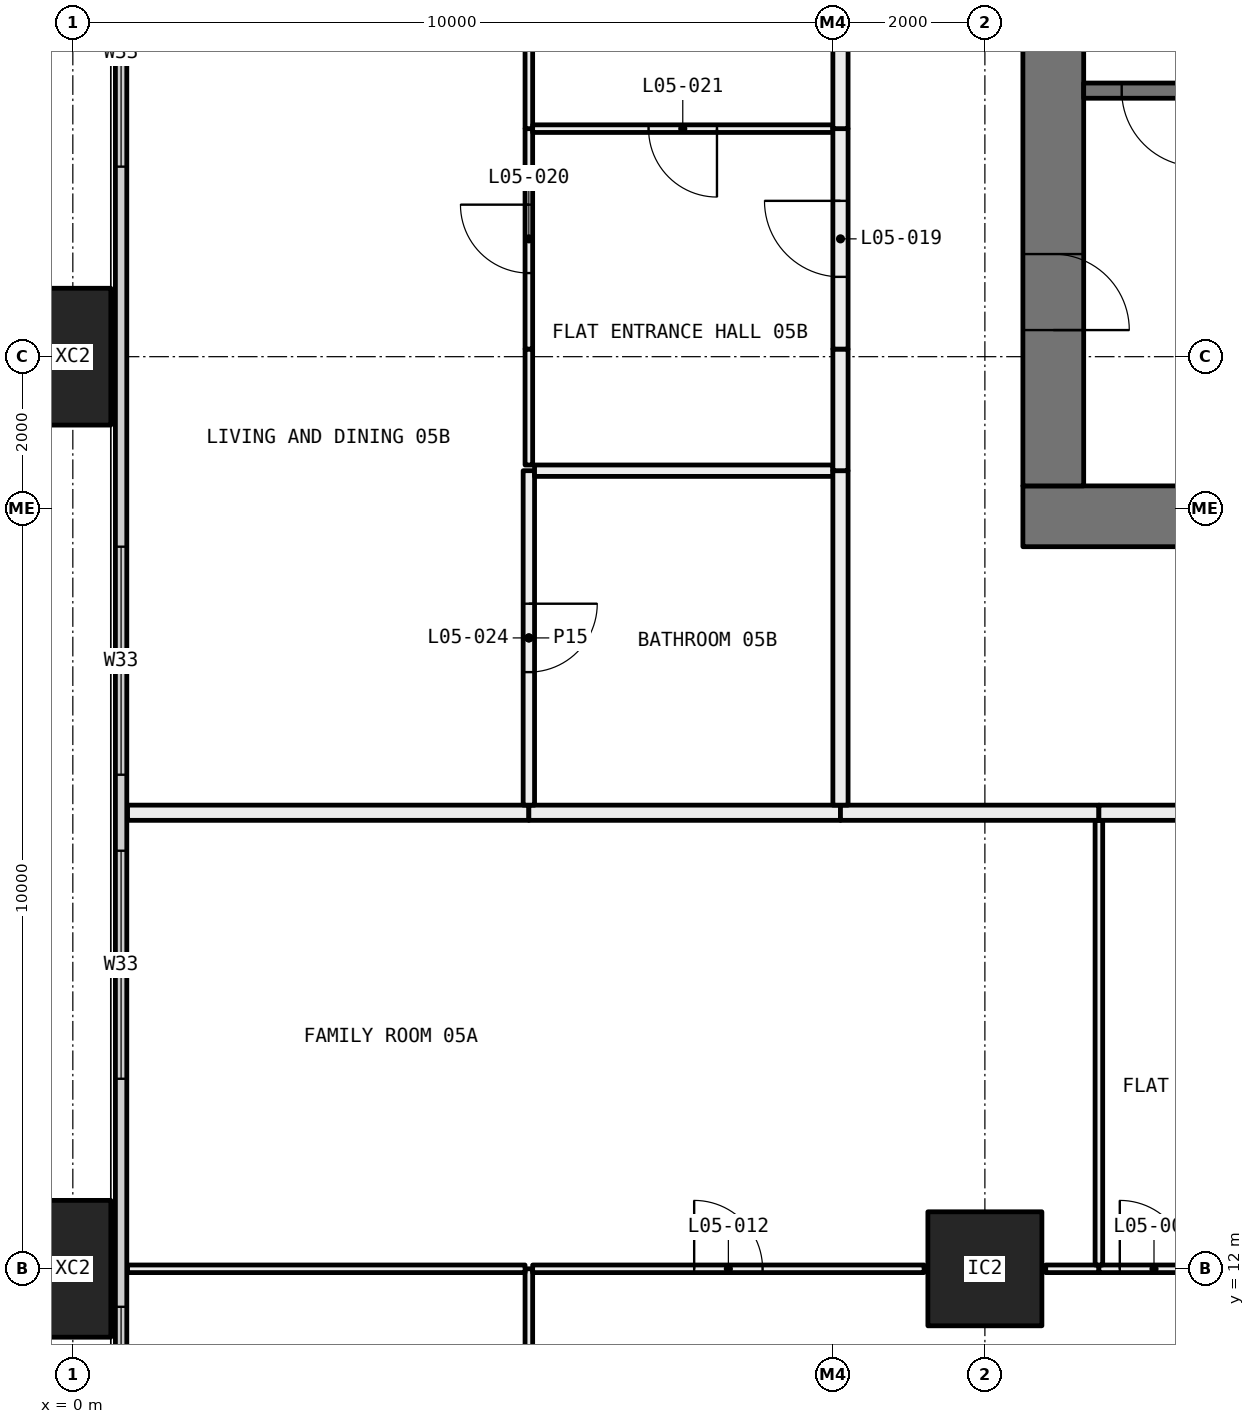
"""IFC4 building model, lengths in metres.
Left out: names, types, materials, properties, quantities, classifications, styles, units other than length and angle.
Written with IfcOpenShell. Run it as: python <this file> out.ifc"""

import sys

from ifc_helpers import new_model, si_unit, direction, frame, frame_2d, origin, origin_2d, place, context, subcontext, project, spatial, rectangle, hollow_rectangle, extrude, element, fill, save


model = new_model("IFC4")
c1 = context("Model", 3, precision=1e-05, world=origin(), true_north=direction((0.0, 1.0)))
c2 = subcontext(c1, "Body", "Model", "MODEL_VIEW")
j1 = project(units=[si_unit("LENGTHUNIT", "METRE"), si_unit("PLANEANGLEUNIT", "RADIAN")], contexts=[c1])
p1 = place(None, origin())
s1 = spatial("IfcSite", under=j1, at=p1, CompositionType="ELEMENT")
p2 = place(p1, origin())
s2 = spatial("IfcBuilding", under=s1, at=p2, CompositionType="ELEMENT")
p3 = place(p2, frame((0.0, 0.0, 30.0)))
s3 = spatial("IfcBuildingStorey", under=s2, at=p3, CompositionType="ELEMENT", Elevation=30.0)
for number, where, z_axis, x_axis in (
    (1, (0.0, 12.0, -0.4), (0.0, 0.0, 1.0), (0.0, 1.0, 0.0)),
    (2, (0.0, 24.0, -0.4), (0.0, 0.0, 1.0), (0.0, 1.0, 0.0)),
):
    element("IfcColumn", number, at=place(p3, frame(where, z_axis=z_axis, x_axis=x_axis)), inside=s3, PredefinedType="COLUMN", context=c2, shape_type="SweptSolid", body=[
        extrude(hollow_rectangle(XDim=1.8, YDim=1.0, WallThickness=0.07, at=origin_2d()), origin(), (0.0, 0.0, 1.0), 3.45),
    ])
p4 = place(p3, frame((12.0, 12.0, 0.0), z_axis=(0.0, 0.0, 1.0), x_axis=(1.0, 0.0, 0.0)))
e3 = element("IfcColumn", 3, at=p4, inside=s3, PredefinedType="COLUMN", context=c2, shape_type="SweptSolid", body=[
    extrude(hollow_rectangle(XDim=1.5, YDim=1.5, WallThickness=0.065, at=origin_2d()), origin(), (0.0, 0.0, 1.0), 3.05),
])
p5 = place(p3, frame((0.635, 6.71, 0.0), z_axis=(0.0, 0.0, 1.0), x_axis=(0.0, 1.0, 0.0)))
e4 = element("IfcWall", 4, at=p5, inside=s3, PredefinedType="ELEMENTEDWALL", context=c2, shape_type="SweptSolid", body=[
    extrude(rectangle(XDim=34.58, YDim=0.15, at=frame_2d((17.29, 0.0))), origin(), (0.0, 0.0, 1.0), 3.05),
])
p6 = place(p5, frame((0.29, 0.0, 0.45)))
e5 = element("IfcOpeningElement", 5, at=p6, cuts=e4, PredefinedType="OPENING", context=c2, shape_type="SweptSolid", body=[
    extrude(rectangle(XDim=4.5, YDim=2.55, at=frame_2d((2.25, 1.275))), frame((0.0, 0.085, 0.0), z_axis=(0.0, -1.0, 0.0), x_axis=(1.0, 0.0, 0.0)), (0.0, 0.0, 1.0), 0.17),
])
p7 = place(p5, frame((7.79, 0.0, 0.45)))
e6 = element("IfcOpeningElement", 6, at=p7, cuts=e4, PredefinedType="OPENING", context=c2, shape_type="SweptSolid", body=[
    extrude(rectangle(XDim=3.0, YDim=2.55, at=frame_2d((1.5, 1.275))), frame((0.0, 0.085, 0.0), z_axis=(0.0, -1.0, 0.0), x_axis=(1.0, 0.0, 0.0)), (0.0, 0.0, 1.0), 0.17),
])
p8 = place(p5, frame((11.79, 0.0, 0.45)))
e7 = element("IfcOpeningElement", 7, at=p8, cuts=e4, PredefinedType="OPENING", context=c2, shape_type="SweptSolid", body=[
    extrude(rectangle(XDim=3.0, YDim=2.55, at=frame_2d((1.5, 1.275))), frame((0.0, 0.085, 0.0), z_axis=(0.0, -1.0, 0.0), x_axis=(1.0, 0.0, 0.0)), (0.0, 0.0, 1.0), 0.17),
])
p9 = place(p5, frame((19.79, 0.0, 0.45)))
e8 = element("IfcOpeningElement", 8, at=p9, cuts=e4, PredefinedType="OPENING", context=c2, shape_type="SweptSolid", body=[
    extrude(rectangle(XDim=3.0, YDim=2.55, at=frame_2d((1.5, 1.275))), frame((0.0, 0.085, 0.0), z_axis=(0.0, -1.0, 0.0), x_axis=(1.0, 0.0, 0.0)), (0.0, 0.0, 1.0), 0.17),
])
p10 = place(p5, frame((23.79, 0.0, 0.45)))
e9 = element("IfcOpeningElement", 9, at=p10, cuts=e4, PredefinedType="OPENING", context=c2, shape_type="SweptSolid", body=[
    extrude(rectangle(XDim=2.0, YDim=2.55, at=frame_2d((1.0, 1.275))), frame((0.0, 0.085, 0.0), z_axis=(0.0, -1.0, 0.0), x_axis=(1.0, 0.0, 0.0)), (0.0, 0.0, 1.0), 0.17),
])
p11 = place(p5, frame((29.79, 0.0, 0.45)))
e10 = element("IfcOpeningElement", 10, at=p11, cuts=e4, PredefinedType="OPENING", context=c2, shape_type="SweptSolid", body=[
    extrude(rectangle(XDim=4.5, YDim=2.55, at=frame_2d((2.25, 1.275))), frame((0.0, 0.085, 0.0), z_axis=(0.0, -1.0, 0.0), x_axis=(1.0, 0.0, 0.0)), (0.0, 0.0, 1.0), 0.17),
])
p12 = place(p3, frame((6.0, 6.72, 0.0), z_axis=(0.0, 0.0, 1.0), x_axis=(0.0, 1.0, 0.0)))
e11 = element("IfcWall", 11, at=p12, inside=s3, PredefinedType="PARTITIONING", context=c2, shape_type="SweptSolid", body=[
    extrude(rectangle(XDim=5.28, YDim=0.1, at=frame_2d((2.64, 0.0))), origin(), (0.0, 0.0, 1.0), 2.45),
])
p13 = place(p12, frame((2.19, 0.0, 0.0)))
e12 = element("IfcOpeningElement", 12, at=p13, cuts=e11, PredefinedType="OPENING", context=c2, shape_type="SweptSolid", body=[
    extrude(rectangle(XDim=0.9, YDim=2.1, at=frame_2d((0.45, 1.05))), frame((0.0, 0.06, 0.0), z_axis=(0.0, -1.0, 0.0), x_axis=(1.0, 0.0, 0.0)), (0.0, 0.0, 1.0), 0.12),
])
p14 = place(p3, frame((5.95, 12.0, 0.0), z_axis=(0.0, 0.0, 1.0), x_axis=(-1.0, 0.0, 0.0)))
e13 = element("IfcWall", 13, at=p14, inside=s3, PredefinedType="PARTITIONING", context=c2, shape_type="SweptSolid", body=[
    extrude(rectangle(XDim=5.23, YDim=0.1, at=frame_2d((2.615, 0.0))), origin(), (0.0, 0.0, 1.0), 2.45),
])
p15 = place(p3, frame((11.2, 12.0, 0.0), z_axis=(0.0, 0.0, 1.0), x_axis=(-1.0, 0.0, 0.0)))
e14 = element("IfcWall", 14, at=p15, inside=s3, PredefinedType="PARTITIONING", context=c2, shape_type="SweptSolid", body=[
    extrude(rectangle(XDim=5.15, YDim=0.1, at=frame_2d((2.575, 0.0))), origin(), (0.0, 0.0, 1.0), 2.45),
])
p16 = place(p15, frame((2.125, 0.0, 0.0)))
e15 = element("IfcOpeningElement", 15, at=p16, cuts=e14, PredefinedType="OPENING", context=c2, shape_type="SweptSolid", body=[
    extrude(rectangle(XDim=0.9, YDim=2.1, at=frame_2d((0.45, 1.05))), frame((0.0, 0.06, 0.0), z_axis=(0.0, -1.0, 0.0), x_axis=(1.0, 0.0, 0.0)), (0.0, 0.0, 1.0), 0.12),
])
p17 = place(p3, frame((13.5, 12.0, 0.0), z_axis=(0.0, 0.0, 1.0), x_axis=(-1.0, 0.0, 0.0)))
e16 = element("IfcWall", 16, at=p17, inside=s3, PredefinedType="PARTITIONING", context=c2, shape_type="SweptSolid", body=[
    extrude(rectangle(XDim=0.7, YDim=0.1, at=frame_2d((0.35, 0.0))), origin(), (0.0, 0.0, 1.0), 2.45),
])
p18 = place(p3, frame((14.95, 12.0, 0.0), z_axis=(0.0, 0.0, 1.0), x_axis=(-1.0, 0.0, 0.0)))
e17 = element("IfcWall", 17, at=p18, inside=s3, PredefinedType="PARTITIONING", context=c2, shape_type="SweptSolid", body=[
    extrude(rectangle(XDim=1.45, YDim=0.1, at=frame_2d((0.725, 0.0))), origin(), (0.0, 0.0, 1.0), 2.45),
])
p19 = place(p18, frame((0.275, 0.0, 0.0)))
e18 = element("IfcOpeningElement", 18, at=p19, cuts=e17, PredefinedType="OPENING", context=c2, shape_type="SweptSolid", body=[
    extrude(rectangle(XDim=0.9, YDim=2.1, at=frame_2d((0.45, 1.05))), frame((0.0, 0.06, 0.0), z_axis=(0.0, -1.0, 0.0), x_axis=(1.0, 0.0, 0.0)), (0.0, 0.0, 1.0), 0.12),
])
p20 = place(p3, frame((13.5, 12.05, 0.0), z_axis=(0.0, 0.0, 1.0), x_axis=(0.0, 1.0, 0.0)))
e19 = element("IfcWall", 19, at=p20, inside=s3, PredefinedType="PARTITIONING", context=c2, shape_type="SweptSolid", body=[
    extrude(rectangle(XDim=5.85, YDim=0.1, at=frame_2d((2.925, 0.0))), origin(), (0.0, 0.0, 1.0), 2.45),
])
p21 = place(p3, frame((6.0, 18.0, 0.0), z_axis=(0.0, 0.0, 1.0), x_axis=(-1.0, 0.0, 0.0)))
e20 = element("IfcWall", 20, at=p21, inside=s3, PredefinedType="PARTITIONING", context=c2, shape_type="SweptSolid", body=[
    extrude(rectangle(XDim=5.28, YDim=0.2, at=frame_2d((2.64, 0.0))), origin(), (0.0, 0.0, 1.0), 3.05),
])
p22 = place(p3, frame((10.1, 18.0, 0.0), z_axis=(0.0, 0.0, 1.0), x_axis=(-1.0, 0.0, 0.0)))
e21 = element("IfcWall", 21, at=p22, inside=s3, PredefinedType="PARTITIONING", context=c2, shape_type="SweptSolid", body=[
    extrude(rectangle(XDim=4.1, YDim=0.2, at=frame_2d((2.05, 0.0))), origin(), (0.0, 0.0, 1.0), 3.05),
])
p23 = place(p3, frame((13.5, 18.0, 0.0), z_axis=(0.0, 0.0, 1.0), x_axis=(-1.0, 0.0, 0.0)))
e22 = element("IfcWall", 22, at=p23, inside=s3, PredefinedType="PARTITIONING", context=c2, shape_type="SweptSolid", body=[
    extrude(rectangle(XDim=3.4, YDim=0.2, at=frame_2d((1.7, 0.0))), origin(), (0.0, 0.0, 1.0), 3.05),
])
p24 = place(p3, frame((18.0, 18.0, 0.0), z_axis=(0.0, 0.0, 1.0), x_axis=(-1.0, 0.0, 0.0)))
e23 = element("IfcWall", 23, at=p24, inside=s3, PredefinedType="PARTITIONING", context=c2, shape_type="SweptSolid", body=[
    extrude(rectangle(XDim=4.5, YDim=0.2, at=frame_2d((2.25, 0.0))), origin(), (0.0, 0.0, 1.0), 3.05),
])
p25 = place(p24, frame((1.75, 0.0, 0.0)))
e24 = element("IfcOpeningElement", 24, at=p25, cuts=e23, PredefinedType="OPENING", context=c2, shape_type="SweptSolid", body=[
    extrude(rectangle(XDim=1.0, YDim=2.1, at=frame_2d((0.5, 1.05))), frame((0.0, 0.11, 0.0), z_axis=(0.0, -1.0, 0.0), x_axis=(1.0, 0.0, 0.0)), (0.0, 0.0, 1.0), 0.22),
])
p26 = place(p3, frame((6.0, 18.1, 0.0), z_axis=(0.0, 0.0, 1.0), x_axis=(0.0, 1.0, 0.0)))
e25 = element("IfcWall", 25, at=p26, inside=s3, PredefinedType="PARTITIONING", context=c2, shape_type="SweptSolid", body=[
    extrude(rectangle(XDim=4.4, YDim=0.15, at=frame_2d((2.2, 0.0))), origin(), (0.0, 0.0, 1.0), 3.05),
])
p27 = place(p26, frame((1.75, 0.0, 0.0)))
e26 = element("IfcOpeningElement", 26, at=p27, cuts=e25, PredefinedType="OPENING", context=c2, shape_type="SweptSolid", body=[
    extrude(rectangle(XDim=0.9, YDim=2.1, at=frame_2d((0.45, 1.05))), frame((0.0, 0.085, 0.0), z_axis=(0.0, -1.0, 0.0), x_axis=(1.0, 0.0, 0.0)), (0.0, 0.0, 1.0), 0.17),
])
p28 = place(p3, frame((6.0, 22.575, 0.0), z_axis=(0.0, 0.0, 1.0), x_axis=(0.0, 1.0, 0.0)))
e27 = element("IfcWall", 27, at=p28, inside=s3, PredefinedType="PARTITIONING", context=c2, shape_type="SweptSolid", body=[
    extrude(rectangle(XDim=1.525, YDim=0.1, at=frame_2d((0.763, 0.0))), origin(), (0.0, 0.0, 1.0), 2.45),
])
p29 = place(p3, frame((6.0, 24.1, 0.0), z_axis=(0.0, 0.0, 1.0), x_axis=(0.0, 1.0, 0.0)))
e28 = element("IfcWall", 28, at=p29, inside=s3, PredefinedType="PARTITIONING", context=c2, shape_type="SweptSolid", body=[
    extrude(rectangle(XDim=2.9, YDim=0.1, at=frame_2d((1.45, 0.0))), origin(), (0.0, 0.0, 1.0), 3.05),
])
p30 = place(p29, frame((1.0, 0.0, 0.0)))
e29 = element("IfcOpeningElement", 29, at=p30, cuts=e28, PredefinedType="OPENING", context=c2, shape_type="SweptSolid", body=[
    extrude(rectangle(XDim=0.9, YDim=2.1, at=frame_2d((0.45, 1.05))), frame((0.0, 0.06, 0.0), z_axis=(0.0, -1.0, 0.0), x_axis=(1.0, 0.0, 0.0)), (0.0, 0.0, 1.0), 0.12),
])
p31 = place(p3, frame((6.0, 27.0, 0.0), z_axis=(0.0, 0.0, 1.0), x_axis=(0.0, 1.0, 0.0)))
e30 = element("IfcWall", 30, at=p31, inside=s3, PredefinedType="PARTITIONING", context=c2, shape_type="SweptSolid", body=[
    extrude(rectangle(XDim=2.95, YDim=0.1, at=frame_2d((1.475, 0.0))), origin(), (0.0, 0.0, 1.0), 3.05),
])
p32 = place(p3, frame((10.0, 22.5, 0.0), z_axis=(0.0, 0.0, 1.0), x_axis=(-1.0, 0.0, 0.0)))
e31 = element("IfcWall", 31, at=p32, inside=s3, PredefinedType="PARTITIONING", context=c2, shape_type="SweptSolid", body=[
    extrude(rectangle(XDim=3.925, YDim=0.15, at=frame_2d((1.962, 0.0))), origin(), (0.0, 0.0, 1.0), 3.05),
])
p33 = place(p3, frame((10.1, 18.1, 0.0), z_axis=(0.0, 0.0, 1.0), x_axis=(0.0, 1.0, 0.0)))
e32 = element("IfcWall", 32, at=p33, inside=s3, PredefinedType="PARTITIONING", context=c2, shape_type="SweptSolid", body=[
    extrude(rectangle(XDim=4.4, YDim=0.2, at=frame_2d((2.2, 0.0))), origin(), (0.0, 0.0, 1.0), 3.05),
])
p34 = place(p3, frame((10.0, 27.0, 0.0), z_axis=(0.0, 0.0, 1.0), x_axis=(-1.0, 0.0, 0.0)))
e33 = element("IfcWall", 33, at=p34, inside=s3, PredefinedType="PARTITIONING", context=c2, shape_type="SweptSolid", body=[
    extrude(rectangle(XDim=3.95, YDim=0.1, at=frame_2d((1.975, 0.0))), origin(), (0.0, 0.0, 1.0), 3.05),
])
p35 = place(p34, frame((1.525, 0.0, 0.0)))
e34 = element("IfcOpeningElement", 34, at=p35, cuts=e33, PredefinedType="OPENING", context=c2, shape_type="SweptSolid", body=[
    extrude(rectangle(XDim=0.9, YDim=2.1, at=frame_2d((0.45, 1.05))), frame((0.0, 0.06, 0.0), z_axis=(0.0, -1.0, 0.0), x_axis=(1.0, 0.0, 0.0)), (0.0, 0.0, 1.0), 0.12),
])
p36 = place(p3, frame((10.1, 22.5, 0.0), z_axis=(0.0, 0.0, 1.0), x_axis=(0.0, 1.0, 0.0)))
e35 = element("IfcWall", 35, at=p36, inside=s3, PredefinedType="PARTITIONING", context=c2, shape_type="SweptSolid", body=[
    extrude(rectangle(XDim=1.6, YDim=0.2, at=frame_2d((0.8, 0.0))), origin(), (0.0, 0.0, 1.0), 2.45),
])
p37 = place(p3, frame((10.1, 24.1, 0.0), z_axis=(0.0, 0.0, 1.0), x_axis=(0.0, 1.0, 0.0)))
e36 = element("IfcWall", 36, at=p37, inside=s3, PredefinedType="PARTITIONING", context=c2, shape_type="SweptSolid", body=[
    extrude(rectangle(XDim=2.9, YDim=0.2, at=frame_2d((1.45, 0.0))), origin(), (0.0, 0.0, 1.0), 3.05),
])
p38 = place(p37, frame((0.95, 0.0, 0.0)))
e37 = element("IfcOpeningElement", 37, at=p38, cuts=e36, PredefinedType="OPENING", context=c2, shape_type="SweptSolid", body=[
    extrude(rectangle(XDim=1.0, YDim=2.1, at=frame_2d((0.5, 1.05))), frame((0.0, 0.11, 0.0), z_axis=(0.0, -1.0, 0.0), x_axis=(1.0, 0.0, 0.0)), (0.0, 0.0, 1.0), 0.22),
])
p39 = place(p3, frame((10.1, 27.0, 0.0), z_axis=(0.0, 0.0, 1.0), x_axis=(0.0, 1.0, 0.0)))
e38 = element("IfcWall", 38, at=p39, inside=s3, PredefinedType="PARTITIONING", context=c2, shape_type="SweptSolid", body=[
    extrude(rectangle(XDim=9.1, YDim=0.2, at=frame_2d((4.55, 0.0))), origin(), (0.0, 0.0, 1.0), 2.45),
])
p40 = place(p3, frame((12.5, 21.9, 0.0), z_axis=(0.0, 0.0, 1.0), x_axis=(1.0, 0.0, 0.0)))
e39 = element("IfcWall", 39, at=p40, inside=s3, PredefinedType="SHEAR", context=c2, shape_type="SweptSolid", body=[
    extrude(rectangle(XDim=11.0, YDim=0.8, at=frame_2d((5.5, 0.0))), origin(), (0.0, 0.0, 1.0), 3.05),
])
p41 = place(p3, frame((12.9, 22.3, 0.0), z_axis=(0.0, 0.0, 1.0), x_axis=(0.0, 1.0, 0.0)))
e40 = element("IfcWall", 40, at=p41, inside=s3, PredefinedType="SHEAR", context=c2, shape_type="SweptSolid", body=[
    extrude(rectangle(XDim=15.4, YDim=0.8, at=frame_2d((7.7, 0.0))), origin(), (0.0, 0.0, 1.0), 3.05),
])
p42 = place(p41, frame((8.15, 0.0, 0.0)))
e41 = element("IfcOpeningElement", 41, at=p42, cuts=e40, PredefinedType="OPENING", context=c2, shape_type="SweptSolid", body=[
    extrude(rectangle(XDim=1.6, YDim=2.1, at=frame_2d((0.8, 1.05))), frame((0.0, 0.41, 0.0), z_axis=(0.0, -1.0, 0.0), x_axis=(1.0, 0.0, 0.0)), (0.0, 0.0, 1.0), 0.82),
])
p43 = place(p41, frame((2.05, 0.0, 0.0)))
e42 = element("IfcOpeningElement", 42, at=p43, cuts=e40, PredefinedType="OPENING", context=c2, shape_type="SweptSolid", body=[
    extrude(rectangle(XDim=1.0, YDim=2.1, at=frame_2d((0.5, 1.05))), frame((0.0, 0.41, 0.0), z_axis=(0.0, -1.0, 0.0), x_axis=(1.0, 0.0, 0.0)), (0.0, 0.0, 1.0), 0.82),
])
p44 = place(p3, frame((13.3, 27.5, 0.0), z_axis=(0.0, 0.0, 1.0), x_axis=(1.0, 0.0, 0.0)))
e43 = element("IfcWall", 43, at=p44, inside=s3, PredefinedType="SOLIDWALL", context=c2, shape_type="SweptSolid", body=[
    extrude(rectangle(XDim=2.0, YDim=0.2, at=frame_2d((1.0, 0.0))), origin(), (0.0, 0.0, 1.0), 3.05),
])
p45 = place(p44, frame((0.5, 0.0, 0.0)))
e44 = element("IfcOpeningElement", 44, at=p45, cuts=e43, PredefinedType="OPENING", context=c2, shape_type="SweptSolid", body=[
    extrude(rectangle(XDim=1.0, YDim=2.1, at=frame_2d((0.5, 1.05))), frame((0.0, 0.11, 0.0), z_axis=(0.0, -1.0, 0.0), x_axis=(1.0, 0.0, 0.0)), (0.0, 0.0, 1.0), 0.22),
])
p46 = place(p6, origin())
e45 = element("IfcWindow", 45, at=p46, inside=s3, PartitioningType="SINGLE_PANEL", PredefinedType="WINDOW", context=c2, shape_type="SweptSolid", body=[
    extrude(rectangle(XDim=4.5, YDim=2.55, at=frame_2d((2.25, 1.275))), frame((0.0, 0.03, 0.0), z_axis=(0.0, -1.0, 0.0), x_axis=(1.0, 0.0, 0.0)), (0.0, 0.0, 1.0), 0.06),
])
fill(e5, e45)
p47 = place(p7, origin())
e46 = element("IfcWindow", 46, at=p47, inside=s3, PartitioningType="SINGLE_PANEL", PredefinedType="WINDOW", context=c2, shape_type="SweptSolid", body=[
    extrude(rectangle(XDim=3.0, YDim=2.55, at=frame_2d((1.5, 1.275))), frame((0.0, 0.03, 0.0), z_axis=(0.0, -1.0, 0.0), x_axis=(1.0, 0.0, 0.0)), (0.0, 0.0, 1.0), 0.06),
])
fill(e6, e46)
p48 = place(p8, origin())
e47 = element("IfcWindow", 47, at=p48, inside=s3, PartitioningType="SINGLE_PANEL", PredefinedType="WINDOW", context=c2, shape_type="SweptSolid", body=[
    extrude(rectangle(XDim=3.0, YDim=2.55, at=frame_2d((1.5, 1.275))), frame((0.0, 0.03, 0.0), z_axis=(0.0, -1.0, 0.0), x_axis=(1.0, 0.0, 0.0)), (0.0, 0.0, 1.0), 0.06),
])
fill(e7, e47)
p49 = place(p9, origin())
e48 = element("IfcWindow", 48, at=p49, inside=s3, PartitioningType="SINGLE_PANEL", PredefinedType="WINDOW", context=c2, shape_type="SweptSolid", body=[
    extrude(rectangle(XDim=3.0, YDim=2.55, at=frame_2d((1.5, 1.275))), frame((0.0, 0.03, 0.0), z_axis=(0.0, -1.0, 0.0), x_axis=(1.0, 0.0, 0.0)), (0.0, 0.0, 1.0), 0.06),
])
fill(e8, e48)
p50 = place(p19, frame((0.9, 0.0, 0.0), x_axis=(-1.0, 0.0, 0.0)))
e49 = element("IfcDoor", 49, at=p50, inside=s3, OperationType="SINGLE_SWING_RIGHT", PredefinedType="DOOR", context=c2, shape_type="SweptSolid", body=[
    extrude(rectangle(XDim=0.9, YDim=2.1, at=frame_2d((0.45, 1.05))), frame((0.0, 0.025, 0.0), z_axis=(0.0, -1.0, 0.0), x_axis=(1.0, 0.0, 0.0)), (0.0, 0.0, 1.0), 0.05),
])
fill(e18, e49)
p51 = place(p16, frame((0.9, 0.0, 0.0), x_axis=(-1.0, 0.0, 0.0)))
e50 = element("IfcDoor", 50, at=p51, inside=s3, OperationType="SINGLE_SWING_RIGHT", PredefinedType="DOOR", context=c2, shape_type="SweptSolid", body=[
    extrude(rectangle(XDim=0.9, YDim=2.1, at=frame_2d((0.45, 1.05))), frame((0.0, 0.025, 0.0), z_axis=(0.0, -1.0, 0.0), x_axis=(1.0, 0.0, 0.0)), (0.0, 0.0, 1.0), 0.05),
])
fill(e15, e50)
p52 = place(p38, origin())
e51 = element("IfcDoor", 51, at=p52, inside=s3, OperationType="SINGLE_SWING_LEFT", PredefinedType="DOOR", context=c2, shape_type="SweptSolid", body=[
    extrude(rectangle(XDim=1.0, YDim=2.1, at=frame_2d((0.5, 1.05))), frame((0.0, 0.025, 0.0), z_axis=(0.0, -1.0, 0.0), x_axis=(1.0, 0.0, 0.0)), (0.0, 0.0, 1.0), 0.05),
])
fill(e37, e51)
p53 = place(p30, origin())
e52 = element("IfcDoor", 52, at=p53, inside=s3, OperationType="SINGLE_SWING_LEFT", PredefinedType="DOOR", context=c2, shape_type="SweptSolid", body=[
    extrude(rectangle(XDim=0.9, YDim=2.1, at=frame_2d((0.45, 1.05))), frame((0.0, 0.025, 0.0), z_axis=(0.0, -1.0, 0.0), x_axis=(1.0, 0.0, 0.0)), (0.0, 0.0, 1.0), 0.05),
])
fill(e29, e52)
p54 = place(p35, origin())
e53 = element("IfcDoor", 53, at=p54, inside=s3, OperationType="SINGLE_SWING_RIGHT", PredefinedType="DOOR", context=c2, shape_type="SweptSolid", body=[
    extrude(rectangle(XDim=0.9, YDim=2.1, at=frame_2d((0.45, 1.05))), frame((0.0, 0.025, 0.0), z_axis=(0.0, -1.0, 0.0), x_axis=(1.0, 0.0, 0.0)), (0.0, 0.0, 1.0), 0.05),
])
fill(e34, e53)
p55 = place(p27, frame((0.9, 0.0, 0.0), x_axis=(-1.0, 0.0, 0.0)))
e54 = element("IfcDoor", 54, at=p55, inside=s3, OperationType="SINGLE_SWING_RIGHT", PredefinedType="DOOR", context=c2, shape_type="SweptSolid", body=[
    extrude(rectangle(XDim=0.9, YDim=2.1, at=frame_2d((0.45, 1.05))), frame((0.0, 0.025, 0.0), z_axis=(0.0, -1.0, 0.0), x_axis=(1.0, 0.0, 0.0)), (0.0, 0.0, 1.0), 0.05),
])
fill(e26, e54)
p56 = place(p45, frame((1.0, 0.0, 0.0), x_axis=(-1.0, 0.0, 0.0)))
e55 = element("IfcDoor", 55, at=p56, inside=s3, OperationType="SINGLE_SWING_RIGHT", PredefinedType="DOOR", context=c2, shape_type="SweptSolid", body=[
    extrude(rectangle(XDim=1.0, YDim=2.1, at=frame_2d((0.5, 1.05))), frame((0.0, 0.025, 0.0), z_axis=(0.0, -1.0, 0.0), x_axis=(1.0, 0.0, 0.0)), (0.0, 0.0, 1.0), 0.05),
])
fill(e44, e55)
p57 = place(p43, frame((1.0, 0.0, 0.0), x_axis=(-1.0, 0.0, 0.0)))
e56 = element("IfcDoor", 56, at=p57, inside=s3, OperationType="SINGLE_SWING_LEFT", PredefinedType="DOOR", context=c2, shape_type="SweptSolid", body=[
    extrude(rectangle(XDim=1.0, YDim=2.1, at=frame_2d((0.5, 1.05))), frame((0.0, 0.025, 0.0), z_axis=(0.0, -1.0, 0.0), x_axis=(1.0, 0.0, 0.0)), (0.0, 0.0, 1.0), 0.05),
])
fill(e42, e56)
save(model, sys.argv[1])
